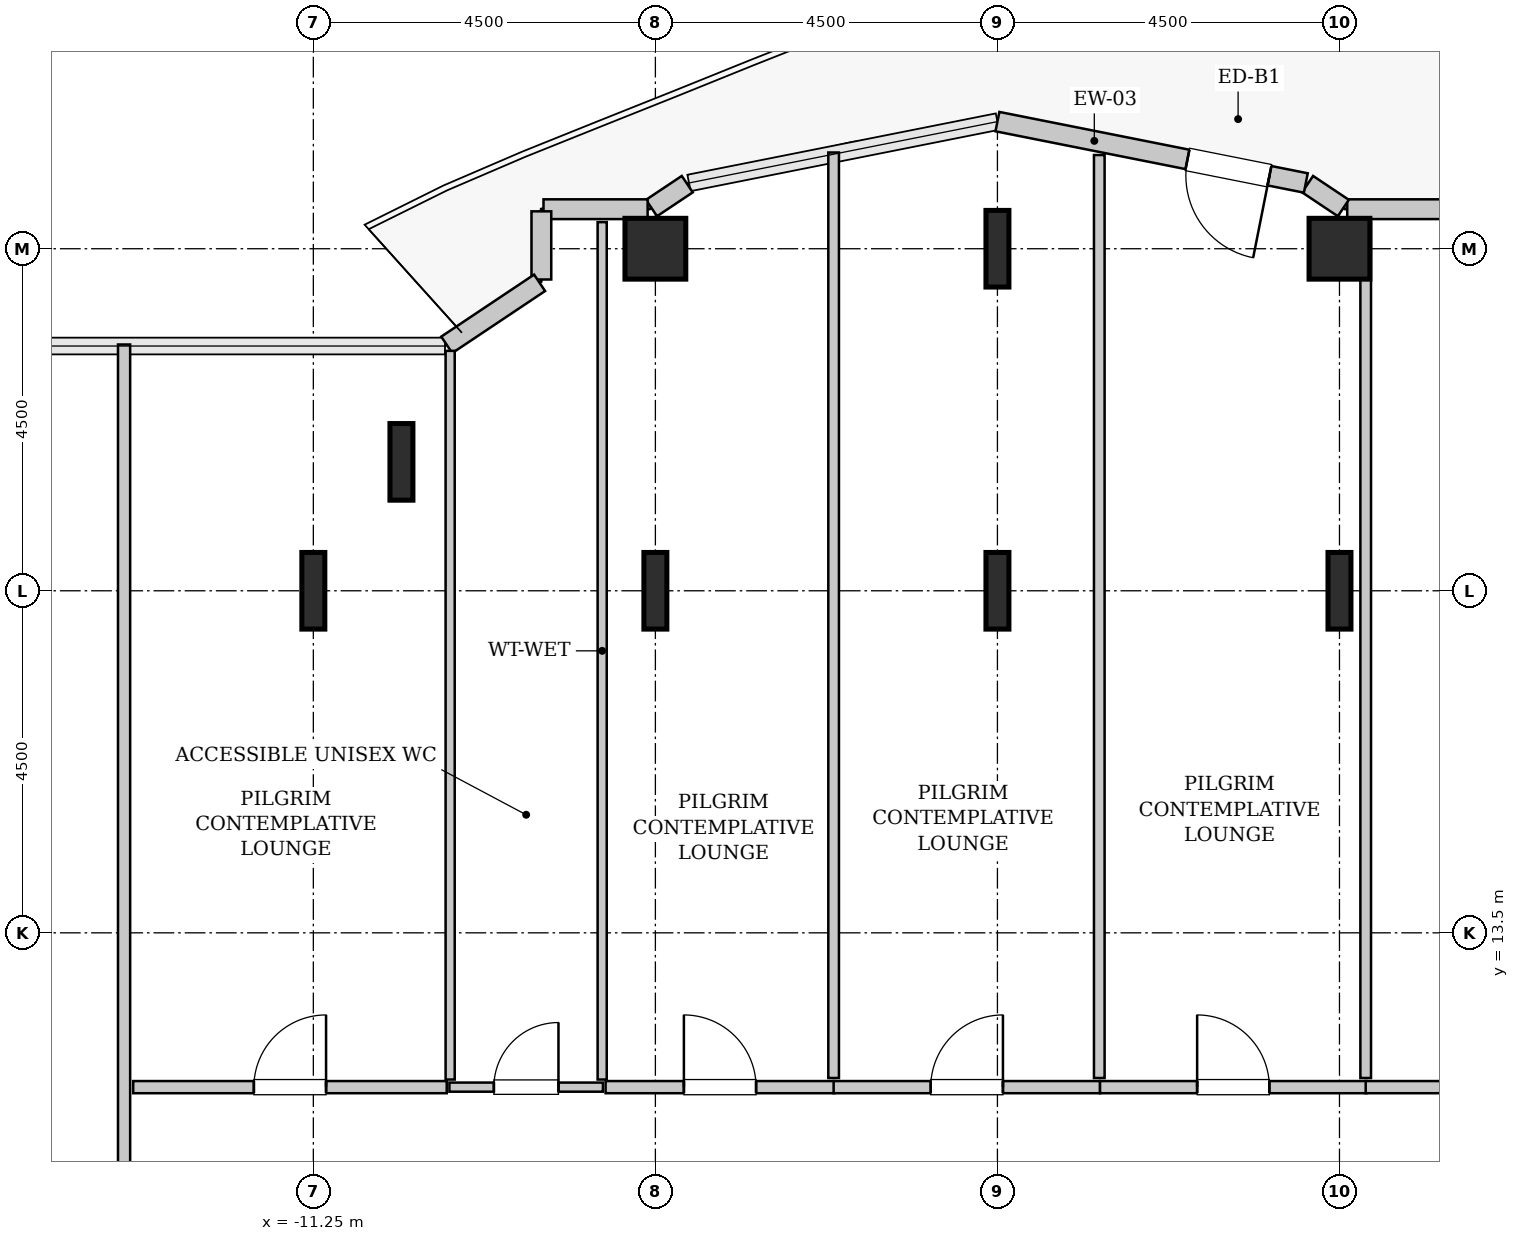
"""IFC4 building model, lengths in metres.
Left out: names, types, materials, properties, quantities, classifications, styles, units other than length and angle.
Written with IfcOpenShell. Run it as: python <this file> out.ifc"""

import sys

from ifc_helpers import new_model, si_unit, direction, frame, frame_2d, origin, origin_2d, place, context, subcontext, project, spatial, rectangle, hollow_rectangle, i_section, extrude, source, transform, mapped, element, fill, save


model = new_model("IFC4")
c1 = context("Model", 3, precision=1e-05, world=origin(), true_north=direction((0.0, 1.0)))
c2 = subcontext(c1, "Body", "Model", "MODEL_VIEW")
j1 = project(units=[si_unit("LENGTHUNIT", "METRE"), si_unit("PLANEANGLEUNIT", "RADIAN")], contexts=[c1])
p1 = place(None, origin())
s1 = spatial("IfcSite", under=j1, at=p1, CompositionType="ELEMENT")
p2 = place(p1, origin())
s2 = spatial("IfcBuilding", under=s1, at=p2, CompositionType="ELEMENT")
p3 = place(p2, frame((0.0, 0.0, 136.4)))
s3 = spatial("IfcBuildingStorey", under=s2, at=p3, CompositionType="ELEMENT", Elevation=136.4)
m1 = source(origin(), c2, "Body", "SweptSolid", [
    extrude(i_section(OverallWidth=0.302, OverallDepth=1.008, WebThickness=0.021, FlangeThickness=0.04, FilletRadius=0.03, at=origin_2d()), origin(), (0.0, 0.0, 1.0), 3.8),
])
for number, where, z_axis, x_axis in (
    (1, (-11.25, 18.0, 0.0), (0.0, 0.0, 1.0), (1.0, 0.0, 0.0)),
    (2, (-10.091, 19.696, 0.0), (0.0, 0.0, 1.0), (1.0, 0.0, 0.0)),
    (3, (-6.75, 18.0, 0.0), (0.0, 0.0, 1.0), (1.0, 0.0, 0.0)),
):
    element("IfcColumn", number, at=place(p3, frame(where, z_axis=z_axis, x_axis=x_axis)), inside=s3, PredefinedType="COLUMN", context=c2, shape_type="MappedRepresentation", body=[
        mapped(m1, transform((0.0, 0.0, 0.0), x_axis=(1.0, 0.0, 0.0), y_axis=(0.0, 1.0, 0.0), z_axis=(0.0, 0.0, 1.0), scale=1.0)),
    ])
m2 = source(origin(), c2, "Body", "SweptSolid", [
    extrude(hollow_rectangle(XDim=0.8, YDim=0.8, WallThickness=0.04, InnerFilletRadius=0.04, OuterFilletRadius=0.08, at=origin_2d()), origin(), (0.0, 0.0, 1.0), 3.8),
])
p4 = place(p3, frame((-6.75, 22.5, 0.0), z_axis=(0.0, 0.0, 1.0), x_axis=(1.0, 0.0, 0.0)))
e4 = element("IfcColumn", 4, at=p4, inside=s3, PredefinedType="COLUMN", context=c2, shape_type="MappedRepresentation", body=[
    mapped(m2, transform((0.0, 0.0, 0.0), x_axis=(1.0, 0.0, 0.0), y_axis=(0.0, 1.0, 0.0), z_axis=(0.0, 0.0, 1.0), scale=1.0)),
])
for number, where, z_axis, x_axis in (
    (5, (-2.25, 18.0, 0.0), (0.0, 0.0, 1.0), (1.0, 0.0, 0.0)),
    (6, (-2.25, 22.5, 0.0), (0.0, 0.0, 1.0), (1.0, 0.0, 0.0)),
    (7, (2.25, 18.0, 0.0), (0.0, 0.0, 1.0), (1.0, 0.0, 0.0)),
):
    element("IfcColumn", number, at=place(p3, frame(where, z_axis=z_axis, x_axis=x_axis)), inside=s3, PredefinedType="COLUMN", context=c2, shape_type="MappedRepresentation", body=[
        mapped(m1, transform((0.0, 0.0, 0.0), x_axis=(1.0, 0.0, 0.0), y_axis=(0.0, 1.0, 0.0), z_axis=(0.0, 0.0, 1.0), scale=1.0)),
    ])
p5 = place(p3, frame((2.25, 22.5, 0.0), z_axis=(0.0, 0.0, 1.0), x_axis=(1.0, 0.0, 0.0)))
e8 = element("IfcColumn", 8, at=p5, inside=s3, PredefinedType="COLUMN", context=c2, shape_type="MappedRepresentation", body=[
    mapped(m2, transform((0.0, 0.0, 0.0), x_axis=(1.0, 0.0, 0.0), y_axis=(0.0, 1.0, 0.0), z_axis=(0.0, 0.0, 1.0), scale=1.0)),
])
m3 = source(origin(), c2, "Body", "SweptSolid", [
    extrude(rectangle(XDim=1.37, YDim=0.26, at=frame_2d((0.685, 0.0))), origin(), (0.0, 0.0, 1.0), 3.55),
])
p6 = place(p3, frame((3.722, 23.02, 0.0), z_axis=(0.0, 0.0, 1.0), x_axis=(-1.0, 0.0, 0.0)))
e9 = element("IfcWall", 9, at=p6, inside=s3, PredefinedType="SOLIDWALL", context=c2, shape_type="MappedRepresentation", body=[
    mapped(m3, transform((0.0, 0.0, 0.0), x_axis=(1.0, 0.0, 0.0), y_axis=(0.0, 1.0, 0.0), z_axis=(0.0, 0.0, 1.0), scale=1.0)),
])
m4 = source(origin(), c2, "Body", "SweptSolid", [
    extrude(rectangle(XDim=0.565, YDim=0.26, at=frame_2d((0.283, 0.0))), origin(), (0.0, 0.0, 1.0), 3.55),
])
p7 = place(p3, frame((2.301, 23.036, 0.0), z_axis=(0.0, 0.0, 1.0), x_axis=(-0.831651492666, 0.555297933317, 0.0)))
e10 = element("IfcWall", 10, at=p7, inside=s3, PredefinedType="SOLIDWALL", context=c2, shape_type="MappedRepresentation", body=[
    mapped(m4, transform((0.0, 0.0, 0.0), x_axis=(1.0, 0.0, 0.0), y_axis=(0.0, 1.0, 0.0), z_axis=(0.0, 0.0, 1.0), scale=1.0)),
])
m5 = source(origin(), c2, "Body", "SweptSolid", [
    extrude(rectangle(XDim=4.137, YDim=0.26, at=frame_2d((2.068, 0.0))), origin(), (0.0, 0.0, 1.0), 3.55),
])
p8 = place(p3, frame((1.807, 23.365, 0.0), z_axis=(0.0, 0.0, 1.0), x_axis=(-0.980782170794, 0.195105954428, 0.0)))
e11 = element("IfcWall", 11, at=p8, inside=s3, PredefinedType="SOLIDWALL", context=c2, shape_type="MappedRepresentation", body=[
    mapped(m5, transform((0.0, 0.0, 0.0), x_axis=(1.0, 0.0, 0.0), y_axis=(0.0, 1.0, 0.0), z_axis=(0.0, 0.0, 1.0), scale=1.0)),
])
p9 = place(p8, frame((0.488, 0.0, 0.0)))
e12 = element("IfcOpeningElement", 12, at=p9, cuts=e11, PredefinedType="OPENING", context=c2, shape_type="SweptSolid", body=[
    extrude(rectangle(XDim=1.1, YDim=2.2, at=frame_2d((0.55, 1.1))), frame((0.0, 0.14, 0.0), z_axis=(0.0, -1.0, 0.0), x_axis=(1.0, 0.0, 0.0)), (0.0, 0.0, 1.0), 0.28),
])
p10 = place(p3, frame((-6.331, 23.35, 0.0), z_axis=(0.0, 0.0, 1.0), x_axis=(-0.831651492666, -0.555297933317, 0.0)))
e13 = element("IfcWall", 13, at=p10, inside=s3, PredefinedType="SOLIDWALL", context=c2, shape_type="MappedRepresentation", body=[
    mapped(m4, transform((0.0, 0.0, 0.0), x_axis=(1.0, 0.0, 0.0), y_axis=(0.0, 1.0, 0.0), z_axis=(0.0, 0.0, 1.0), scale=1.0)),
])
p11 = place(p3, frame((-6.852, 23.02, 0.0), z_axis=(0.0, 0.0, 1.0), x_axis=(-1.0, 0.0, 0.0)))
e14 = element("IfcWall", 14, at=p11, inside=s3, PredefinedType="SOLIDWALL", context=c2, shape_type="MappedRepresentation", body=[
    mapped(m3, transform((0.0, 0.0, 0.0), x_axis=(1.0, 0.0, 0.0), y_axis=(0.0, 1.0, 0.0), z_axis=(0.0, 0.0, 1.0), scale=1.0)),
])
m6 = source(origin(), c2, "Body", "SweptSolid", [
    extrude(rectangle(XDim=0.897, YDim=0.26, at=frame_2d((0.448, 0.0))), origin(), (0.0, 0.0, 1.0), 3.55),
])
p12 = place(p3, frame((-8.25, 22.992, 0.0), z_axis=(0.0, 0.0, 1.0), x_axis=(0.0, -1.0, 0.0)))
e15 = element("IfcWall", 15, at=p12, inside=s3, PredefinedType="SOLIDWALL", context=c2, shape_type="MappedRepresentation", body=[
    mapped(m6, transform((0.0, 0.0, 0.0), x_axis=(1.0, 0.0, 0.0), y_axis=(0.0, 1.0, 0.0), z_axis=(0.0, 0.0, 1.0), scale=1.0)),
])
m7 = source(origin(), c2, "Body", "SweptSolid", [
    extrude(rectangle(XDim=1.469, YDim=0.26, at=frame_2d((0.734, 0.0))), origin(), (0.0, 0.0, 1.0), 3.55),
])
p13 = place(p3, frame((-8.273, 22.052, 0.0), z_axis=(0.0, 0.0, 1.0), x_axis=(-0.831461760506, -0.555581983884, 0.0)))
e16 = element("IfcWall", 16, at=p13, inside=s3, PredefinedType="SOLIDWALL", context=c2, shape_type="MappedRepresentation", body=[
    mapped(m7, transform((0.0, 0.0, 0.0), x_axis=(1.0, 0.0, 0.0), y_axis=(0.0, 1.0, 0.0), z_axis=(0.0, 0.0, 1.0), scale=1.0)),
])
m8 = source(origin(), c2, "Body", "SweptSolid", [
    extrude(rectangle(XDim=2.02, YDim=0.12, at=frame_2d((1.01, 0.0))), origin(), (0.0, 0.0, 1.0), 3.535),
])
p14 = place(p3, frame((-9.46, 11.47, 0.0), z_axis=(0.0, 0.0, 1.0), x_axis=(1.0, 0.0, 0.0)))
e17 = element("IfcWall", 17, at=p14, inside=s3, PredefinedType="PLUMBINGWALL", context=c2, shape_type="MappedRepresentation", body=[
    mapped(m8, transform((0.0, 0.0, 0.0), x_axis=(1.0, 0.0, 0.0), y_axis=(0.0, 1.0, 0.0), z_axis=(0.0, 0.0, 1.0), scale=1.0)),
])
p15 = place(p14, frame((0.585, 0.0, 0.0)))
e18 = element("IfcOpeningElement", 18, at=p15, cuts=e17, PredefinedType="OPENING", context=c2, shape_type="SweptSolid", body=[
    extrude(rectangle(XDim=0.85, YDim=2.1, at=frame_2d((0.425, 1.05))), frame((0.0, 0.07, 0.0), z_axis=(0.0, -1.0, 0.0), x_axis=(1.0, 0.0, 0.0)), (0.0, 0.0, 1.0), 0.14),
])
m9 = source(origin(), c2, "Body", "SweptSolid", [
    extrude(rectangle(XDim=11.28, YDim=0.12, at=frame_2d((5.64, 0.0))), origin(), (0.0, 0.0, 1.0), 3.535),
])
p16 = place(p3, frame((-7.45, 11.57, 0.0), z_axis=(0.0, 0.0, 1.0), x_axis=(0.0, 1.0, 0.0)))
e19 = element("IfcWall", 19, at=p16, inside=s3, PredefinedType="PLUMBINGWALL", context=c2, shape_type="MappedRepresentation", body=[
    mapped(m9, transform((0.0, 0.0, 0.0), x_axis=(1.0, 0.0, 0.0), y_axis=(0.0, 1.0, 0.0), z_axis=(0.0, 0.0, 1.0), scale=1.0)),
])
m10 = source(origin(), c2, "Body", "SweptSolid", [
    extrude(rectangle(XDim=9.587, YDim=0.12, at=frame_2d((4.793, 0.0))), origin(), (0.0, 0.0, 1.0), 3.535),
])
p17 = place(p3, frame((-9.45, 11.57, 0.0), z_axis=(0.0, 0.0, 1.0), x_axis=(0.0, 1.0, 0.0)))
e20 = element("IfcWall", 20, at=p17, inside=s3, PredefinedType="PLUMBINGWALL", context=c2, shape_type="MappedRepresentation", body=[
    mapped(m10, transform((0.0, 0.0, 0.0), x_axis=(1.0, 0.0, 0.0), y_axis=(0.0, 1.0, 0.0), z_axis=(0.0, 0.0, 1.0), scale=1.0)),
])
m11 = source(origin(), c2, "Body", "SweptSolid", [
    extrude(rectangle(XDim=13.353, YDim=0.16, at=frame_2d((6.676, 0.0))), origin(), (0.0, 0.0, 1.0), 3.535),
])
p18 = place(p3, frame((-13.74, 7.887, 0.0), z_axis=(0.0, 0.0, 1.0), x_axis=(0.0, 1.0, 0.0)))
e21 = element("IfcWall", 21, at=p18, inside=s3, PredefinedType="PARTITIONING", context=c2, shape_type="MappedRepresentation", body=[
    mapped(m11, transform((0.0, 0.0, 0.0), x_axis=(1.0, 0.0, 0.0), y_axis=(0.0, 1.0, 0.0), z_axis=(0.0, 0.0, 1.0), scale=1.0)),
])
p19 = place(p18, frame((1.336, 0.0, 0.0)))
e22 = element("IfcOpeningElement", 22, at=p19, cuts=e21, PredefinedType="OPENING", context=c2, shape_type="SweptSolid", body=[
    extrude(rectangle(XDim=0.95, YDim=2.1, at=frame_2d((0.475, 1.05))), frame((0.0, 0.09, 0.0), z_axis=(0.0, -1.0, 0.0), x_axis=(1.0, 0.0, 0.0)), (0.0, 0.0, 1.0), 0.18),
])
m12 = source(origin(), c2, "Body", "SweptSolid", [
    extrude(rectangle(XDim=4.125, YDim=0.16, at=frame_2d((2.062, 0.0))), origin(), (0.0, 0.0, 1.0), 3.535),
])
p20 = place(p3, frame((-13.62, 11.47, 0.0), z_axis=(0.0, 0.0, 1.0), x_axis=(1.0, 0.0, 0.0)))
e23 = element("IfcWall", 23, at=p20, inside=s3, PredefinedType="PARTITIONING", context=c2, shape_type="MappedRepresentation", body=[
    mapped(m12, transform((0.0, 0.0, 0.0), x_axis=(1.0, 0.0, 0.0), y_axis=(0.0, 1.0, 0.0), z_axis=(0.0, 0.0, 1.0), scale=1.0)),
])
p21 = place(p20, frame((1.587, 0.0, 0.0)))
e24 = element("IfcOpeningElement", 24, at=p21, cuts=e23, PredefinedType="OPENING", context=c2, shape_type="SweptSolid", body=[
    extrude(rectangle(XDim=0.95, YDim=2.1, at=frame_2d((0.475, 1.05))), frame((0.0, 0.09, 0.0), z_axis=(0.0, -1.0, 0.0), x_axis=(1.0, 0.0, 0.0)), (0.0, 0.0, 1.0), 0.18),
])
m13 = source(origin(), c2, "Body", "SweptSolid", [
    extrude(rectangle(XDim=3.01, YDim=0.16, at=frame_2d((1.505, 0.0))), origin(), (0.0, 0.0, 1.0), 3.535),
])
p22 = place(p3, frame((-7.405, 11.47, 0.0), z_axis=(0.0, 0.0, 1.0), x_axis=(1.0, 0.0, 0.0)))
e25 = element("IfcWall", 25, at=p22, inside=s3, PredefinedType="PARTITIONING", context=c2, shape_type="MappedRepresentation", body=[
    mapped(m13, transform((0.0, 0.0, 0.0), x_axis=(1.0, 0.0, 0.0), y_axis=(0.0, 1.0, 0.0), z_axis=(0.0, 0.0, 1.0), scale=1.0)),
])
p23 = place(p22, frame((1.03, 0.0, 0.0)))
e26 = element("IfcOpeningElement", 26, at=p23, cuts=e25, PredefinedType="OPENING", context=c2, shape_type="SweptSolid", body=[
    extrude(rectangle(XDim=0.95, YDim=2.1, at=frame_2d((0.475, 1.05))), frame((0.0, 0.09, 0.0), z_axis=(0.0, -1.0, 0.0), x_axis=(1.0, 0.0, 0.0)), (0.0, 0.0, 1.0), 0.18),
])
m14 = source(origin(), c2, "Body", "SweptSolid", [
    extrude(rectangle(XDim=12.176, YDim=0.14, at=frame_2d((6.088, 0.0))), origin(), (0.0, 0.0, 1.0), 3.535),
])
p24 = place(p3, frame((-4.405, 11.59, 0.0), z_axis=(0.0, 0.0, 1.0), x_axis=(0.0, 1.0, 0.0)))
e27 = element("IfcWall", 27, at=p24, inside=s3, PredefinedType="PARTITIONING", context=c2, shape_type="MappedRepresentation", body=[
    mapped(m14, transform((0.0, 0.0, 0.0), x_axis=(1.0, 0.0, 0.0), y_axis=(0.0, 1.0, 0.0), z_axis=(0.0, 0.0, 1.0), scale=1.0)),
])
m15 = source(origin(), c2, "Body", "SweptSolid", [
    extrude(rectangle(XDim=3.505, YDim=0.16, at=frame_2d((1.752, 0.0))), origin(), (0.0, 0.0, 1.0), 3.535),
])
p25 = place(p3, frame((-4.405, 11.47, 0.0), z_axis=(0.0, 0.0, 1.0), x_axis=(1.0, 0.0, 0.0)))
e28 = element("IfcWall", 28, at=p25, inside=s3, PredefinedType="PARTITIONING", context=c2, shape_type="MappedRepresentation", body=[
    mapped(m15, transform((0.0, 0.0, 0.0), x_axis=(1.0, 0.0, 0.0), y_axis=(0.0, 1.0, 0.0), z_axis=(0.0, 0.0, 1.0), scale=1.0)),
])
p26 = place(p25, frame((1.278, 0.0, 0.0)))
e29 = element("IfcOpeningElement", 29, at=p26, cuts=e28, PredefinedType="OPENING", context=c2, shape_type="SweptSolid", body=[
    extrude(rectangle(XDim=0.95, YDim=2.1, at=frame_2d((0.475, 1.05))), frame((0.0, 0.09, 0.0), z_axis=(0.0, -1.0, 0.0), x_axis=(1.0, 0.0, 0.0)), (0.0, 0.0, 1.0), 0.18),
])
m16 = source(origin(), c2, "Body", "SweptSolid", [
    extrude(rectangle(XDim=12.143, YDim=0.14, at=frame_2d((6.071, 0.0))), origin(), (0.0, 0.0, 1.0), 3.535),
])
p27 = place(p3, frame((-0.91, 11.59, 0.0), z_axis=(0.0, 0.0, 1.0), x_axis=(0.0, 1.0, 0.0)))
e30 = element("IfcWall", 30, at=p27, inside=s3, PredefinedType="PARTITIONING", context=c2, shape_type="MappedRepresentation", body=[
    mapped(m16, transform((0.0, 0.0, 0.0), x_axis=(1.0, 0.0, 0.0), y_axis=(0.0, 1.0, 0.0), z_axis=(0.0, 0.0, 1.0), scale=1.0)),
])
m17 = source(origin(), c2, "Body", "SweptSolid", [
    extrude(rectangle(XDim=3.505, YDim=0.16, at=frame_2d((1.752, 0.0))), origin(), (0.0, 0.0, 1.0), 3.535),
])
p28 = place(p3, frame((-0.9, 11.47, 0.0), z_axis=(0.0, 0.0, 1.0), x_axis=(1.0, 0.0, 0.0)))
e31 = element("IfcWall", 31, at=p28, inside=s3, PredefinedType="PARTITIONING", context=c2, shape_type="MappedRepresentation", body=[
    mapped(m17, transform((0.0, 0.0, 0.0), x_axis=(1.0, 0.0, 0.0), y_axis=(0.0, 1.0, 0.0), z_axis=(0.0, 0.0, 1.0), scale=1.0)),
])
p29 = place(p28, frame((1.278, 0.0, 0.0)))
e32 = element("IfcOpeningElement", 32, at=p29, cuts=e31, PredefinedType="OPENING", context=c2, shape_type="SweptSolid", body=[
    extrude(rectangle(XDim=0.95, YDim=2.1, at=frame_2d((0.475, 1.05))), frame((0.0, 0.09, 0.0), z_axis=(0.0, -1.0, 0.0), x_axis=(1.0, 0.0, 0.0)), (0.0, 0.0, 1.0), 0.18),
])
m18 = source(origin(), c2, "Body", "SweptSolid", [
    extrude(rectangle(XDim=11.26, YDim=0.14, at=frame_2d((5.63, 0.0))), origin(), (0.0, 0.0, 1.0), 2.875),
])
p30 = place(p3, frame((2.595, 11.59, 0.0), z_axis=(0.0, 0.0, 1.0), x_axis=(0.0, 1.0, 0.0)))
e33 = element("IfcWall", 33, at=p30, inside=s3, PredefinedType="PARTITIONING", context=c2, shape_type="MappedRepresentation", body=[
    mapped(m18, transform((0.0, 0.0, 0.0), x_axis=(1.0, 0.0, 0.0), y_axis=(0.0, 1.0, 0.0), z_axis=(0.0, 0.0, 1.0), scale=1.0)),
])
m19 = source(origin(), c2, "Body", "SweptSolid", [
    extrude(rectangle(XDim=5.61, YDim=0.16, at=frame_2d((2.805, 0.0))), origin(), (0.0, 0.0, 1.0), 3.535),
])
p31 = place(p3, frame((2.595, 11.47, 0.0), z_axis=(0.0, 0.0, 1.0), x_axis=(1.0, 0.0, 0.0)))
e34 = element("IfcWall", 34, at=p31, inside=s3, PredefinedType="PARTITIONING", context=c2, shape_type="MappedRepresentation", body=[
    mapped(m19, transform((0.0, 0.0, 0.0), x_axis=(1.0, 0.0, 0.0), y_axis=(0.0, 1.0, 0.0), z_axis=(0.0, 0.0, 1.0), scale=1.0)),
])
p32 = place(p31, frame((2.33, 0.0, 0.0)))
e35 = element("IfcOpeningElement", 35, at=p32, cuts=e34, PredefinedType="OPENING", context=c2, shape_type="SweptSolid", body=[
    extrude(rectangle(XDim=0.95, YDim=2.1, at=frame_2d((0.475, 1.05))), frame((0.0, 0.09, 0.0), z_axis=(0.0, -1.0, 0.0), x_axis=(1.0, 0.0, 0.0)), (0.0, 0.0, 1.0), 0.18),
])
m20 = source(origin(), c2, "Body", "SweptSolid", [
    extrude(rectangle(XDim=1.1, YDim=2.2, at=frame_2d((0.55, 1.1))), frame((0.0, 0.025, 0.0), z_axis=(0.0, -1.0, 0.0), x_axis=(1.0, 0.0, 0.0)), (0.0, 0.0, 1.0), 0.05),
])
p33 = place(p9, origin())
e36 = element("IfcDoor", 36, at=p33, inside=s3, OperationType="SINGLE_SWING_LEFT", PredefinedType="DOOR", context=c2, shape_type="MappedRepresentation", body=[
    mapped(m20, transform((0.0, 0.0, 0.0), x_axis=(1.0, 0.0, 0.0), y_axis=(0.0, 1.0, 0.0), z_axis=(0.0, 0.0, 1.0), scale=1.0)),
])
fill(e12, e36)
m21 = source(origin(), c2, "Body", "SweptSolid", [
    extrude(rectangle(XDim=0.85, YDim=2.1, at=frame_2d((0.425, 1.05))), frame((0.0, 0.025, 0.0), z_axis=(0.0, -1.0, 0.0), x_axis=(1.0, 0.0, 0.0)), (0.0, 0.0, 1.0), 0.05),
])
p34 = place(p15, origin())
e37 = element("IfcDoor", 37, at=p34, inside=s3, OperationType="SINGLE_SWING_RIGHT", PredefinedType="DOOR", context=c2, shape_type="MappedRepresentation", body=[
    mapped(m21, transform((0.0, 0.0, 0.0), x_axis=(1.0, 0.0, 0.0), y_axis=(0.0, 1.0, 0.0), z_axis=(0.0, 0.0, 1.0), scale=1.0)),
])
fill(e18, e37)
m22 = source(origin(), c2, "Body", "SweptSolid", [
    extrude(rectangle(XDim=0.95, YDim=2.1, at=frame_2d((0.475, 1.05))), frame((0.0, 0.025, 0.0), z_axis=(0.0, -1.0, 0.0), x_axis=(1.0, 0.0, 0.0)), (0.0, 0.0, 1.0), 0.05),
])
p35 = place(p21, origin())
e38 = element("IfcDoor", 38, at=p35, inside=s3, OperationType="SINGLE_SWING_RIGHT", PredefinedType="DOOR", context=c2, shape_type="MappedRepresentation", body=[
    mapped(m22, transform((0.0, 0.0, 0.0), x_axis=(1.0, 0.0, 0.0), y_axis=(0.0, 1.0, 0.0), z_axis=(0.0, 0.0, 1.0), scale=1.0)),
])
fill(e24, e38)
p36 = place(p23, origin())
e39 = element("IfcDoor", 39, at=p36, inside=s3, OperationType="SINGLE_SWING_LEFT", PredefinedType="DOOR", context=c2, shape_type="MappedRepresentation", body=[
    mapped(m22, transform((0.0, 0.0, 0.0), x_axis=(1.0, 0.0, 0.0), y_axis=(0.0, 1.0, 0.0), z_axis=(0.0, 0.0, 1.0), scale=1.0)),
])
fill(e26, e39)
p37 = place(p26, origin())
e40 = element("IfcDoor", 40, at=p37, inside=s3, OperationType="SINGLE_SWING_RIGHT", PredefinedType="DOOR", context=c2, shape_type="MappedRepresentation", body=[
    mapped(m22, transform((0.0, 0.0, 0.0), x_axis=(1.0, 0.0, 0.0), y_axis=(0.0, 1.0, 0.0), z_axis=(0.0, 0.0, 1.0), scale=1.0)),
])
fill(e29, e40)
p38 = place(p29, origin())
e41 = element("IfcDoor", 41, at=p38, inside=s3, OperationType="SINGLE_SWING_LEFT", PredefinedType="DOOR", context=c2, shape_type="MappedRepresentation", body=[
    mapped(m22, transform((0.0, 0.0, 0.0), x_axis=(1.0, 0.0, 0.0), y_axis=(0.0, 1.0, 0.0), z_axis=(0.0, 0.0, 1.0), scale=1.0)),
])
fill(e32, e41)
save(model, sys.argv[1])
